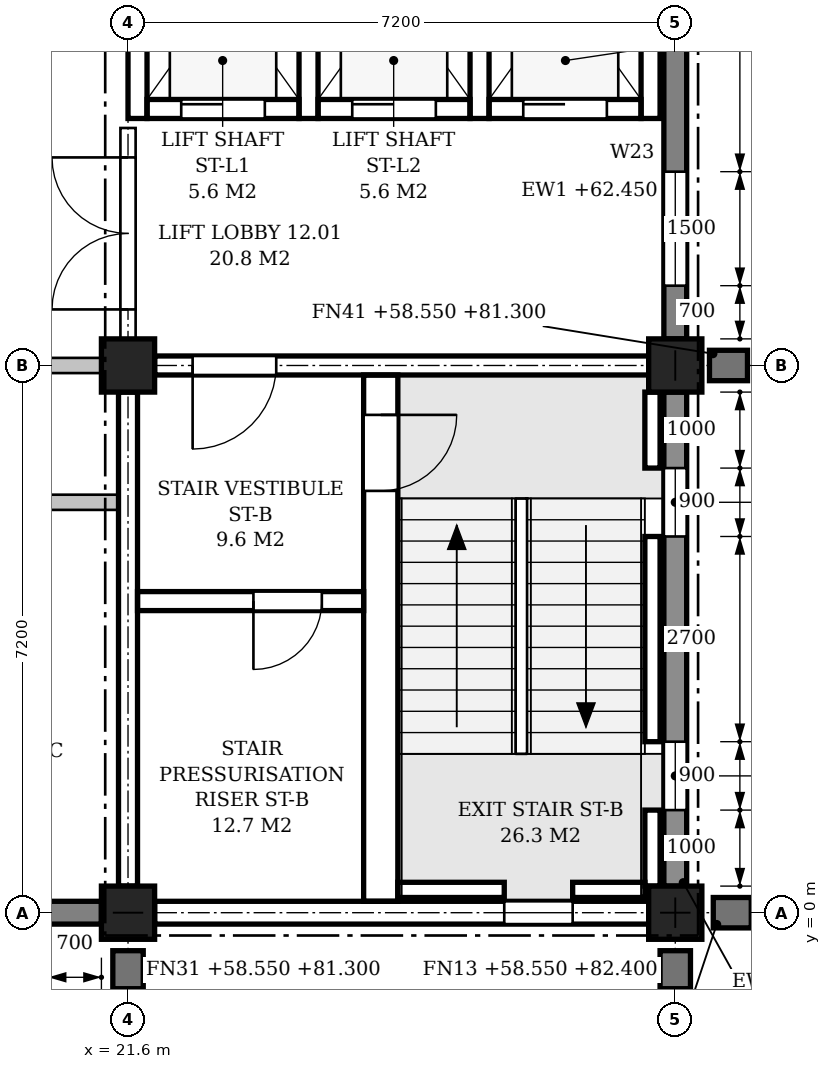
"""IFC4 building model, lengths in metres.
Left out: names, types, materials, properties, quantities, classifications, styles, units other than length and angle.
Written with IfcOpenShell. Run it as: python <this file> out.ifc"""

import sys

from ifc_helpers import new_model, si_unit, direction, frame, frame_2d, origin, origin_2d, place, context, subcontext, project, spatial, polyline, rectangle, outline, extrude, element, fill, save


model = new_model("IFC4")
c1 = context("Model", 3, precision=1e-05, world=origin(), true_north=direction((0.0, 1.0)))
c2 = subcontext(c1, "Body", "Model", "MODEL_VIEW")
j1 = project(units=[si_unit("LENGTHUNIT", "METRE"), si_unit("PLANEANGLEUNIT", "RADIAN")], contexts=[c1])
p1 = place(None, origin())
s1 = spatial("IfcSite", under=j1, at=p1, CompositionType="ELEMENT")
p2 = place(p1, origin())
s2 = spatial("IfcBuilding", under=s1, at=p2, CompositionType="ELEMENT")
p3 = place(p2, frame((0.0, 0.0, 58.8)))
s3 = spatial("IfcBuildingStorey", under=s2, at=p3, CompositionType="ELEMENT", Elevation=58.8)
for number, where, z_axis, x_axis in (
    (1, (21.6, 0.0, 0.0), (0.0, 0.0, 1.0), (1.0, 0.0, 0.0)),
    (2, (21.6, 7.2, 0.0), (0.0, 0.0, 1.0), (1.0, 0.0, 0.0)),
    (3, (28.8, 0.0, 0.0), (0.0, 0.0, 1.0), (1.0, 0.0, 0.0)),
    (4, (28.8, 7.2, 0.0), (0.0, 0.0, 1.0), (1.0, 0.0, 0.0)),
):
    element("IfcColumn", number, at=place(p3, frame(where, z_axis=z_axis, x_axis=x_axis)), inside=s3, PredefinedType="COLUMN", context=c2, shape_type="SweptSolid", body=[
        extrude(rectangle(XDim=0.7, YDim=0.7, at=origin_2d()), origin(), (0.0, 0.0, 1.0), 4.5),
    ])
p4 = place(p3, frame((14.75, 0.0, 0.0), z_axis=(0.0, 0.0, 1.0), x_axis=(1.0, 0.0, 0.0)))
e5 = element("IfcWall", 5, at=p4, inside=s3, PredefinedType="STANDARD", context=c2, shape_type="SweptSolid", body=[
    extrude(rectangle(XDim=6.5, YDim=0.3, at=frame_2d((3.25, 0.0))), origin(), (0.0, 0.0, 1.0), 3.65),
])
p5 = place(p4, frame((0.7, 0.0, 0.9)))
e6 = element("IfcOpeningElement", 6, at=p5, cuts=e5, PredefinedType="OPENING", context=c2, shape_type="SweptSolid", body=[
    extrude(outline(polyline([(0.0, 0.0), (1.5, 0.0), (1.5, 1.95), (0.75, 2.7), (0.0, 1.95), (0.0, 0.0)])), frame((0.0, 0.16, 0.0), z_axis=(0.0, -1.0, 0.0), x_axis=(1.0, 0.0, 0.0)), (0.0, 0.0, 1.0), 0.32),
])
p6 = place(p4, frame((4.3, 0.0, 0.9)))
e7 = element("IfcOpeningElement", 7, at=p6, cuts=e5, PredefinedType="OPENING", context=c2, shape_type="SweptSolid", body=[
    extrude(outline(polyline([(0.0, 0.0), (1.5, 0.0), (1.5, 1.95), (0.75, 2.7), (0.0, 1.95), (0.0, 0.0)])), frame((0.0, 0.16, 0.0), z_axis=(0.0, -1.0, 0.0), x_axis=(1.0, 0.0, 0.0)), (0.0, 0.0, 1.0), 0.32),
])
p7 = place(p3, frame((21.95, 0.0, 0.0), z_axis=(0.0, 0.0, 1.0), x_axis=(1.0, 0.0, 0.0)))
e8 = element("IfcWall", 8, at=p7, inside=s3, PredefinedType="STANDARD", context=c2, shape_type="SweptSolid", body=[
    extrude(rectangle(XDim=6.5, YDim=0.3, at=frame_2d((3.25, 0.0))), origin(), (0.0, 0.0, 1.0), 3.65),
])
p8 = place(p7, frame((4.6, 0.0, 0.9)))
e9 = element("IfcOpeningElement", 9, at=p8, cuts=e8, PredefinedType="OPENING", context=c2, shape_type="SweptSolid", body=[
    extrude(outline(polyline([(0.0, 0.0), (0.9, 0.0), (0.9, 2.25), (0.45, 2.7), (0.0, 2.25), (0.0, 0.0)])), frame((0.0, 0.16, 0.0), z_axis=(0.0, -1.0, 0.0), x_axis=(1.0, 0.0, 0.0)), (0.0, 0.0, 1.0), 0.32),
])
p9 = place(p3, frame((28.8, 0.35, 0.0), z_axis=(0.0, 0.0, 1.0), x_axis=(0.0, 1.0, 0.0)))
e10 = element("IfcWall", 10, at=p9, inside=s3, PredefinedType="STANDARD", context=c2, shape_type="SweptSolid", body=[
    extrude(rectangle(XDim=6.5, YDim=0.3, at=frame_2d((3.25, 0.0))), origin(), (0.0, 0.0, 1.0), 3.65),
])
p10 = place(p9, frame((1.0, 0.0, 0.9)))
e11 = element("IfcOpeningElement", 11, at=p10, cuts=e10, PredefinedType="OPENING", context=c2, shape_type="SweptSolid", body=[
    extrude(outline(polyline([(0.0, 0.0), (0.9, 0.0), (0.9, 2.25), (0.45, 2.7), (0.0, 2.25), (0.0, 0.0)])), frame((0.0, 0.16, 0.0), z_axis=(0.0, -1.0, 0.0), x_axis=(1.0, 0.0, 0.0)), (0.0, 0.0, 1.0), 0.32),
])
p11 = place(p9, frame((4.6, 0.0, 0.9)))
e12 = element("IfcOpeningElement", 12, at=p11, cuts=e10, PredefinedType="OPENING", context=c2, shape_type="SweptSolid", body=[
    extrude(outline(polyline([(0.0, 0.0), (0.9, 0.0), (0.9, 2.25), (0.45, 2.7), (0.0, 2.25), (0.0, 0.0)])), frame((0.0, 0.16, 0.0), z_axis=(0.0, -1.0, 0.0), x_axis=(1.0, 0.0, 0.0)), (0.0, 0.0, 1.0), 0.32),
])
p12 = place(p3, frame((28.8, 7.55, 0.0), z_axis=(0.0, 0.0, 1.0), x_axis=(0.0, 1.0, 0.0)))
e13 = element("IfcWall", 13, at=p12, inside=s3, PredefinedType="STANDARD", context=c2, shape_type="SweptSolid", body=[
    extrude(rectangle(XDim=6.5, YDim=0.3, at=frame_2d((3.25, 0.0))), origin(), (0.0, 0.0, 1.0), 3.65),
])
p13 = place(p12, frame((0.7, 0.0, 0.9)))
e14 = element("IfcOpeningElement", 14, at=p13, cuts=e13, PredefinedType="OPENING", context=c2, shape_type="SweptSolid", body=[
    extrude(outline(polyline([(0.0, 0.0), (1.5, 0.0), (1.5, 1.95), (0.75, 2.7), (0.0, 1.95), (0.0, 0.0)])), frame((0.0, 0.16, 0.0), z_axis=(0.0, -1.0, 0.0), x_axis=(1.0, 0.0, 0.0)), (0.0, 0.0, 1.0), 0.32),
])
p14 = place(p3, frame((21.6, -0.5, -0.25), z_axis=(0.0, 0.0, 1.0), x_axis=(0.0, -1.0, 0.0)))
e15 = element("IfcWall", 15, at=p14, inside=s3, PredefinedType="POLYGONAL", context=c2, shape_type="SweptSolid", body=[
    extrude(outline(polyline([(0.5, 0.0), (0.5, 22.225), (0.15, 22.75), (0.0, 22.75), (0.0, 0.0), (0.5, 0.0)])), frame((0.0, 0.2, 0.0), z_axis=(0.0, -1.0, 0.0), x_axis=(1.0, 0.0, 0.0)), (0.0, 0.0, 1.0), 0.4),
])
for number, where, z_axis, x_axis in (
    (16, (28.8, -0.5, -0.25), (0.0, 0.0, 1.0), (0.0, -1.0, 0.0)),
    (17, (29.3, 0.0, -0.25), (0.0, 0.0, 1.0), (1.0, 0.0, 0.0)),
):
    element("IfcWall", number, at=place(p3, frame(where, z_axis=z_axis, x_axis=x_axis)), inside=s3, PredefinedType="POLYGONAL", context=c2, shape_type="SweptSolid", body=[
        extrude(outline(polyline([(0.5, 0.0), (0.5, 23.85), (0.0, 23.85), (0.0, 0.0), (0.5, 0.0)])), frame((0.0, 0.2, 0.0), z_axis=(0.0, -1.0, 0.0), x_axis=(1.0, 0.0, 0.0)), (0.0, 0.0, 1.0), 0.4),
    ])
p15 = place(p3, frame((29.25, 7.2, -0.25), z_axis=(0.0, 0.0, 1.0), x_axis=(1.0, 0.0, 0.0)))
e18 = element("IfcWall", 18, at=p15, inside=s3, PredefinedType="POLYGONAL", context=c2, shape_type="SweptSolid", body=[
    extrude(outline(polyline([(0.5, 0.0), (0.5, 22.225), (0.15, 22.75), (0.0, 22.75), (0.0, 0.0), (0.5, 0.0)])), frame((0.0, 0.2, 0.0), z_axis=(0.0, -1.0, 0.0), x_axis=(1.0, 0.0, 0.0)), (0.0, 0.0, 1.0), 0.4),
])
p16 = place(p3, frame((21.95, 7.2, 0.0), z_axis=(0.0, 0.0, 1.0), x_axis=(1.0, 0.0, 0.0)))
e19 = element("IfcWall", 19, at=p16, inside=s3, PredefinedType="SHEAR", context=c2, shape_type="SweptSolid", body=[
    extrude(rectangle(XDim=6.5, YDim=0.25, at=frame_2d((3.25, 0.0))), origin(), (0.0, 0.0, 1.0), 3.6),
])
p17 = place(p16, frame((0.5, 0.0, 0.0)))
e20 = element("IfcOpeningElement", 20, at=p17, cuts=e19, PredefinedType="OPENING", context=c2, shape_type="SweptSolid", body=[
    extrude(rectangle(XDim=1.1, YDim=2.1, at=frame_2d((0.55, 1.05))), frame((0.0, 0.135, 0.0), z_axis=(0.0, -1.0, 0.0), x_axis=(1.0, 0.0, 0.0)), (0.0, 0.0, 1.0), 0.27),
])
p18 = place(p3, frame((21.6, 0.35, 0.0), z_axis=(0.0, 0.0, 1.0), x_axis=(0.0, 1.0, 0.0)))
e21 = element("IfcWall", 21, at=p18, inside=s3, PredefinedType="SHEAR", context=c2, shape_type="SweptSolid", body=[
    extrude(rectangle(XDim=6.5, YDim=0.25, at=frame_2d((3.25, 0.0))), origin(), (0.0, 0.0, 1.0), 3.6),
])
p19 = place(p3, frame((28.5, 0.35, -0.25), z_axis=(0.0, 0.0, 1.0), x_axis=(0.0, 1.0, 0.0)))
e22 = element("IfcWall", 22, at=p19, inside=s3, PredefinedType="SHEAR", context=c2, shape_type="SweptSolid", body=[
    extrude(rectangle(XDim=1.0, YDim=0.2, at=frame_2d((0.5, 0.0))), origin(), (0.0, 0.0, 1.0), 4.5),
])
p20 = place(p3, frame((28.5, 2.25, -0.25), z_axis=(0.0, 0.0, 1.0), x_axis=(0.0, 1.0, 0.0)))
e23 = element("IfcWall", 23, at=p20, inside=s3, PredefinedType="SHEAR", context=c2, shape_type="SweptSolid", body=[
    extrude(rectangle(XDim=2.7, YDim=0.2, at=frame_2d((1.35, 0.0))), origin(), (0.0, 0.0, 1.0), 4.5),
])
p21 = place(p3, frame((28.5, 5.85, -0.25), z_axis=(0.0, 0.0, 1.0), x_axis=(0.0, 1.0, 0.0)))
e24 = element("IfcWall", 24, at=p21, inside=s3, PredefinedType="SHEAR", context=c2, shape_type="SweptSolid", body=[
    extrude(rectangle(XDim=1.0, YDim=0.2, at=frame_2d((0.5, 0.0))), origin(), (0.0, 0.0, 1.0), 4.5),
])
p22 = place(p3, frame((25.15, 0.3, -0.25), z_axis=(0.0, 0.0, 1.0), x_axis=(1.0, 0.0, 0.0)))
e25 = element("IfcWall", 25, at=p22, inside=s3, PredefinedType="SHEAR", context=c2, shape_type="SweptSolid", body=[
    extrude(rectangle(XDim=1.4, YDim=0.2, at=frame_2d((0.7, 0.0))), origin(), (0.0, 0.0, 1.0), 4.5),
])
p23 = place(p3, frame((27.45, 0.3, -0.25), z_axis=(0.0, 0.0, 1.0), x_axis=(1.0, 0.0, 0.0)))
e26 = element("IfcWall", 26, at=p23, inside=s3, PredefinedType="SHEAR", context=c2, shape_type="SweptSolid", body=[
    extrude(rectangle(XDim=0.95, YDim=0.2, at=frame_2d((0.475, 0.0))), origin(), (0.0, 0.0, 1.0), 4.5),
])
p24 = place(p3, frame((24.925, 0.15, 0.0), z_axis=(0.0, 0.0, 1.0), x_axis=(0.0, 1.0, 0.0)))
e27 = element("IfcWall", 27, at=p24, inside=s3, PredefinedType="SHEAR", context=c2, shape_type="SweptSolid", body=[
    extrude(rectangle(XDim=6.925, YDim=0.45, at=frame_2d((3.462, 0.0))), origin(), (0.0, 0.0, 1.0), 4.25),
])
p25 = place(p24, frame((5.4, 0.0, 0.0)))
e28 = element("IfcOpeningElement", 28, at=p25, cuts=e27, PredefinedType="OPENING", context=c2, shape_type="SweptSolid", body=[
    extrude(rectangle(XDim=1.0, YDim=2.1, at=frame_2d((0.5, 1.05))), frame((0.0, 0.235, 0.0), z_axis=(0.0, -1.0, 0.0), x_axis=(1.0, 0.0, 0.0)), (0.0, 0.0, 1.0), 0.47),
])
p26 = place(p3, frame((21.725, 4.1, 0.0), z_axis=(0.0, 0.0, 1.0), x_axis=(1.0, 0.0, 0.0)))
e29 = element("IfcWall", 29, at=p26, inside=s3, PredefinedType="SHEAR", context=c2, shape_type="SweptSolid", body=[
    extrude(rectangle(XDim=2.975, YDim=0.25, at=frame_2d((1.487, 0.0))), origin(), (0.0, 0.0, 1.0), 4.25),
])
p27 = place(p26, frame((1.525, 0.0, 0.0)))
e30 = element("IfcOpeningElement", 30, at=p27, cuts=e29, PredefinedType="OPENING", context=c2, shape_type="SweptSolid", body=[
    extrude(rectangle(XDim=0.9, YDim=2.1, at=frame_2d((0.45, 1.05))), frame((0.0, 0.135, 0.0), z_axis=(0.0, -1.0, 0.0), x_axis=(1.0, 0.0, 0.0)), (0.0, 0.0, 1.0), 0.27),
])
p28 = place(p3, frame((21.725, 10.45, -0.25), z_axis=(0.0, 0.0, 1.0), x_axis=(0.0, 1.0, 0.0)))
e31 = element("IfcWall", 31, at=p28, inside=s3, PredefinedType="SHEAR", context=c2, shape_type="SweptSolid", body=[
    extrude(rectangle(XDim=3.6, YDim=0.25, at=frame_2d((1.8, 0.0))), origin(), (0.0, 0.0, 1.0), 3.85),
])
for number, where, z_axis, x_axis in (
    (32, (23.975, 10.45, -0.25), (0.0, 0.0, 1.0), (0.0, 1.0, 0.0)),
    (33, (26.225, 10.45, -0.25), (0.0, 0.0, 1.0), (0.0, 1.0, 0.0)),
):
    element("IfcWall", number, at=place(p3, frame(where, z_axis=z_axis, x_axis=x_axis)), inside=s3, PredefinedType="SHEAR", context=c2, shape_type="SweptSolid", body=[
        extrude(rectangle(XDim=3.3, YDim=0.25, at=frame_2d((1.65, 0.0))), origin(), (0.0, 0.0, 1.0), 4.5),
    ])
p29 = place(p3, frame((28.475, 10.45, -0.25), z_axis=(0.0, 0.0, 1.0), x_axis=(0.0, 1.0, 0.0)))
e34 = element("IfcWall", 34, at=p29, inside=s3, PredefinedType="SHEAR", context=c2, shape_type="SweptSolid", body=[
    extrude(rectangle(XDim=3.6, YDim=0.25, at=frame_2d((1.8, 0.0))), origin(), (0.0, 0.0, 1.0), 4.5),
])
p30 = place(p3, frame((21.85, 10.575, -0.25), z_axis=(0.0, 0.0, 1.0), x_axis=(1.0, 0.0, 0.0)))
e35 = element("IfcWall", 35, at=p30, inside=s3, PredefinedType="SHEAR", context=c2, shape_type="SweptSolid", body=[
    extrude(rectangle(XDim=2.0, YDim=0.25, at=frame_2d((1.0, 0.0))), origin(), (0.0, 0.0, 1.0), 4.5),
])
p31 = place(p30, frame((0.45, 0.0, 0.25)))
e36 = element("IfcOpeningElement", 36, at=p31, cuts=e35, PredefinedType="OPENING", context=c2, shape_type="SweptSolid", body=[
    extrude(rectangle(XDim=1.1, YDim=2.1, at=frame_2d((0.55, 1.05))), frame((0.0, 0.135, 0.0), z_axis=(0.0, -1.0, 0.0), x_axis=(1.0, 0.0, 0.0)), (0.0, 0.0, 1.0), 0.27),
])
p32 = place(p3, frame((24.1, 10.575, -0.25), z_axis=(0.0, 0.0, 1.0), x_axis=(1.0, 0.0, 0.0)))
e37 = element("IfcWall", 37, at=p32, inside=s3, PredefinedType="SHEAR", context=c2, shape_type="SweptSolid", body=[
    extrude(rectangle(XDim=2.0, YDim=0.25, at=frame_2d((1.0, 0.0))), origin(), (0.0, 0.0, 1.0), 4.5),
])
p33 = place(p32, frame((0.45, 0.0, 0.25)))
e38 = element("IfcOpeningElement", 38, at=p33, cuts=e37, PredefinedType="OPENING", context=c2, shape_type="SweptSolid", body=[
    extrude(rectangle(XDim=1.1, YDim=2.1, at=frame_2d((0.55, 1.05))), frame((0.0, 0.135, 0.0), z_axis=(0.0, -1.0, 0.0), x_axis=(1.0, 0.0, 0.0)), (0.0, 0.0, 1.0), 0.27),
])
p34 = place(p3, frame((26.35, 10.575, -0.25), z_axis=(0.0, 0.0, 1.0), x_axis=(1.0, 0.0, 0.0)))
e39 = element("IfcWall", 39, at=p34, inside=s3, PredefinedType="SHEAR", context=c2, shape_type="SweptSolid", body=[
    extrude(rectangle(XDim=2.0, YDim=0.25, at=frame_2d((1.0, 0.0))), origin(), (0.0, 0.0, 1.0), 4.5),
])
p35 = place(p34, frame((0.45, 0.0, 0.25)))
e40 = element("IfcOpeningElement", 40, at=p35, cuts=e39, PredefinedType="OPENING", context=c2, shape_type="SweptSolid", body=[
    extrude(rectangle(XDim=1.1, YDim=2.1, at=frame_2d((0.55, 1.05))), frame((0.0, 0.135, 0.0), z_axis=(0.0, -1.0, 0.0), x_axis=(1.0, 0.0, 0.0)), (0.0, 0.0, 1.0), 0.27),
])
p36 = place(p3, frame((7.325, 5.4, 0.0), z_axis=(0.0, 0.0, 1.0), x_axis=(1.0, 0.0, 0.0)))
e41 = element("IfcWall", 41, at=p36, inside=s3, PredefinedType="PARTITIONING", context=c2, shape_type="SweptSolid", body=[
    extrude(outline(polyline([(0.0, 0.0), (14.15, 0.0), (14.15, 3.6), (14.075, 3.6), (14.075, 4.25), (7.275, 4.25), (7.275, 3.6), (6.875, 3.6), (6.875, 4.25), (0.075, 4.25), (0.075, 3.6), (0.0, 3.6), (0.0, 0.0)])), frame((0.0, 0.1, 0.0), z_axis=(0.0, -1.0, 0.0), x_axis=(1.0, 0.0, 0.0)), (0.0, 0.0, 1.0), 0.2),
])
p37 = place(p36, frame((1.238, 0.0, 0.0)))
e42 = element("IfcOpeningElement", 42, at=p37, cuts=e41, PredefinedType="OPENING", context=c2, shape_type="SweptSolid", body=[
    extrude(rectangle(XDim=1.0, YDim=2.1, at=frame_2d((0.5, 1.05))), frame((0.0, 0.11, 0.0), z_axis=(0.0, -1.0, 0.0), x_axis=(1.0, 0.0, 0.0)), (0.0, 0.0, 1.0), 0.22),
])
p38 = place(p36, frame((4.775, 0.0, 0.0)))
e43 = element("IfcOpeningElement", 43, at=p38, cuts=e41, PredefinedType="OPENING", context=c2, shape_type="SweptSolid", body=[
    extrude(rectangle(XDim=1.0, YDim=2.1, at=frame_2d((0.5, 1.05))), frame((0.0, 0.11, 0.0), z_axis=(0.0, -1.0, 0.0), x_axis=(1.0, 0.0, 0.0)), (0.0, 0.0, 1.0), 0.22),
])
p39 = place(p36, frame((8.375, 0.0, 0.0)))
e44 = element("IfcOpeningElement", 44, at=p39, cuts=e41, PredefinedType="OPENING", context=c2, shape_type="SweptSolid", body=[
    extrude(rectangle(XDim=1.0, YDim=2.1, at=frame_2d((0.5, 1.05))), frame((0.0, 0.11, 0.0), z_axis=(0.0, -1.0, 0.0), x_axis=(1.0, 0.0, 0.0)), (0.0, 0.0, 1.0), 0.22),
])
p40 = place(p36, frame((11.913, 0.0, 0.0)))
e45 = element("IfcOpeningElement", 45, at=p40, cuts=e41, PredefinedType="OPENING", context=c2, shape_type="SweptSolid", body=[
    extrude(rectangle(XDim=1.0, YDim=2.1, at=frame_2d((0.5, 1.05))), frame((0.0, 0.11, 0.0), z_axis=(0.0, -1.0, 0.0), x_axis=(1.0, 0.0, 0.0)), (0.0, 0.0, 1.0), 0.22),
])
p41 = place(p3, frame((14.75, 7.2, 0.0), z_axis=(0.0, 0.0, 1.0), x_axis=(1.0, 0.0, 0.0)))
e46 = element("IfcWall", 46, at=p41, inside=s3, PredefinedType="PARTITIONING", context=c2, shape_type="SweptSolid", body=[
    extrude(rectangle(XDim=6.5, YDim=0.2, at=frame_2d((3.25, 0.0))), origin(), (0.0, 0.0, 1.0), 3.6),
])
p42 = place(p41, frame((4.375, 0.0, 0.0)))
e47 = element("IfcOpeningElement", 47, at=p42, cuts=e46, PredefinedType="OPENING", context=c2, shape_type="SweptSolid", body=[
    extrude(rectangle(XDim=1.0, YDim=2.1, at=frame_2d((0.5, 1.05))), frame((0.0, 0.11, 0.0), z_axis=(0.0, -1.0, 0.0), x_axis=(1.0, 0.0, 0.0)), (0.0, 0.0, 1.0), 0.22),
])
p43 = place(p3, frame((21.6, 7.55, 0.0), z_axis=(0.0, 0.0, 1.0), x_axis=(0.0, 1.0, 0.0)))
e48 = element("IfcWall", 48, at=p43, inside=s3, PredefinedType="PARTITIONING", context=c2, shape_type="SweptSolid", body=[
    extrude(rectangle(XDim=2.775, YDim=0.2, at=frame_2d((1.387, 0.0))), origin(), (0.0, 0.0, 1.0), 3.6),
])
p44 = place(p43, frame((0.387, 0.0, 0.0)))
e49 = element("IfcOpeningElement", 49, at=p44, cuts=e48, PredefinedType="OPENING", context=c2, shape_type="SweptSolid", body=[
    extrude(rectangle(XDim=2.0, YDim=2.4, at=frame_2d((1.0, 1.2))), frame((0.0, 0.11, 0.0), z_axis=(0.0, -1.0, 0.0), x_axis=(1.0, 0.0, 0.0)), (0.0, 0.0, 1.0), 0.22),
])
p45 = place(p10, origin())
e50 = element("IfcWindow", 50, at=p45, inside=s3, PartitioningType="SINGLE_PANEL", PredefinedType="WINDOW", context=c2, shape_type="SweptSolid", body=[
    extrude(outline(polyline([(0.0, 0.0), (0.9, 0.0), (0.9, 2.25), (0.45, 2.7), (0.0, 2.25), (0.0, 0.0)])), frame((0.0, 0.03, 0.0), z_axis=(0.0, -1.0, 0.0), x_axis=(1.0, 0.0, 0.0)), (0.0, 0.0, 1.0), 0.06),
])
fill(e11, e50)
p46 = place(p11, origin())
e51 = element("IfcWindow", 51, at=p46, inside=s3, PartitioningType="SINGLE_PANEL", PredefinedType="WINDOW", context=c2, shape_type="SweptSolid", body=[
    extrude(outline(polyline([(0.0, 0.0), (0.9, 0.0), (0.9, 2.25), (0.45, 2.7), (0.0, 2.25), (0.0, 0.0)])), frame((0.0, 0.03, 0.0), z_axis=(0.0, -1.0, 0.0), x_axis=(1.0, 0.0, 0.0)), (0.0, 0.0, 1.0), 0.06),
])
fill(e12, e51)
p47 = place(p13, origin())
e52 = element("IfcWindow", 52, at=p47, inside=s3, PartitioningType="SINGLE_PANEL", PredefinedType="WINDOW", context=c2, shape_type="SweptSolid", body=[
    extrude(outline(polyline([(0.0, 0.0), (1.5, 0.0), (1.5, 1.95), (0.75, 2.7), (0.0, 1.95), (0.0, 0.0)])), frame((0.0, 0.03, 0.0), z_axis=(0.0, -1.0, 0.0), x_axis=(1.0, 0.0, 0.0)), (0.0, 0.0, 1.0), 0.06),
])
fill(e14, e52)
p48 = place(p8, origin())
e53 = element("IfcWindow", 53, at=p48, inside=s3, PartitioningType="SINGLE_PANEL", PredefinedType="WINDOW", context=c2, shape_type="SweptSolid", body=[
    extrude(outline(polyline([(0.0, 0.0), (0.9, 0.0), (0.9, 2.25), (0.45, 2.7), (0.0, 2.25), (0.0, 0.0)])), frame((0.0, 0.03, 0.0), z_axis=(0.0, -1.0, 0.0), x_axis=(1.0, 0.0, 0.0)), (0.0, 0.0, 1.0), 0.06),
])
fill(e9, e53)
p49 = place(p25, frame((1.0, 0.0, 0.0), z_axis=(0.0, 0.0, 1.0), x_axis=(-1.0, 0.0, 0.0)))
e54 = element("IfcDoor", 54, at=p49, inside=s3, OperationType="SINGLE_SWING_LEFT", PredefinedType="DOOR", context=c2, shape_type="SweptSolid", body=[
    extrude(rectangle(XDim=1.0, YDim=2.1, at=frame_2d((0.5, 1.05))), frame((0.0, 0.025, 0.0), z_axis=(0.0, -1.0, 0.0), x_axis=(1.0, 0.0, 0.0)), (0.0, 0.0, 1.0), 0.05),
])
fill(e28, e54)
p50 = place(p17, frame((1.1, 0.0, 0.0), z_axis=(0.0, 0.0, 1.0), x_axis=(-1.0, 0.0, 0.0)))
e55 = element("IfcDoor", 55, at=p50, inside=s3, OperationType="SINGLE_SWING_RIGHT", PredefinedType="DOOR", context=c2, shape_type="SweptSolid", body=[
    extrude(rectangle(XDim=1.1, YDim=2.1, at=frame_2d((0.55, 1.05))), frame((0.0, 0.025, 0.0), z_axis=(0.0, -1.0, 0.0), x_axis=(1.0, 0.0, 0.0)), (0.0, 0.0, 1.0), 0.05),
])
fill(e20, e55)
p51 = place(p27, frame((0.9, 0.0, 0.0), z_axis=(0.0, 0.0, 1.0), x_axis=(-1.0, 0.0, 0.0)))
e56 = element("IfcDoor", 56, at=p51, inside=s3, OperationType="SINGLE_SWING_RIGHT", PredefinedType="DOOR", context=c2, shape_type="SweptSolid", body=[
    extrude(rectangle(XDim=0.9, YDim=2.1, at=frame_2d((0.45, 1.05))), frame((0.0, 0.025, 0.0), z_axis=(0.0, -1.0, 0.0), x_axis=(1.0, 0.0, 0.0)), (0.0, 0.0, 1.0), 0.05),
])
fill(e30, e56)
p52 = place(p31, origin())
e57 = element("IfcDoor", 57, at=p52, inside=s3, OperationType="SLIDING_TO_LEFT", PredefinedType="DOOR", context=c2, shape_type="SweptSolid", body=[
    extrude(rectangle(XDim=1.1, YDim=2.1, at=frame_2d((0.55, 1.05))), frame((0.0, 0.025, 0.0), z_axis=(0.0, -1.0, 0.0), x_axis=(1.0, 0.0, 0.0)), (0.0, 0.0, 1.0), 0.05),
])
fill(e36, e57)
p53 = place(p33, origin())
e58 = element("IfcDoor", 58, at=p53, inside=s3, OperationType="SLIDING_TO_LEFT", PredefinedType="DOOR", context=c2, shape_type="SweptSolid", body=[
    extrude(rectangle(XDim=1.1, YDim=2.1, at=frame_2d((0.55, 1.05))), frame((0.0, 0.025, 0.0), z_axis=(0.0, -1.0, 0.0), x_axis=(1.0, 0.0, 0.0)), (0.0, 0.0, 1.0), 0.05),
])
fill(e38, e58)
p54 = place(p35, origin())
e59 = element("IfcDoor", 59, at=p54, inside=s3, OperationType="SLIDING_TO_LEFT", PredefinedType="DOOR", context=c2, shape_type="SweptSolid", body=[
    extrude(rectangle(XDim=1.1, YDim=2.1, at=frame_2d((0.55, 1.05))), frame((0.0, 0.025, 0.0), z_axis=(0.0, -1.0, 0.0), x_axis=(1.0, 0.0, 0.0)), (0.0, 0.0, 1.0), 0.05),
])
fill(e40, e59)
p55 = place(p44, origin())
e60 = element("IfcDoor", 60, at=p55, inside=s3, OperationType="DOUBLE_DOOR_SINGLE_SWING", PredefinedType="DOOR", context=c2, shape_type="SweptSolid", body=[
    extrude(rectangle(XDim=2.0, YDim=2.4, at=frame_2d((1.0, 1.2))), frame((0.0, 0.025, 0.0), z_axis=(0.0, -1.0, 0.0), x_axis=(1.0, 0.0, 0.0)), (0.0, 0.0, 1.0), 0.05),
])
fill(e49, e60)
save(model, sys.argv[1])
